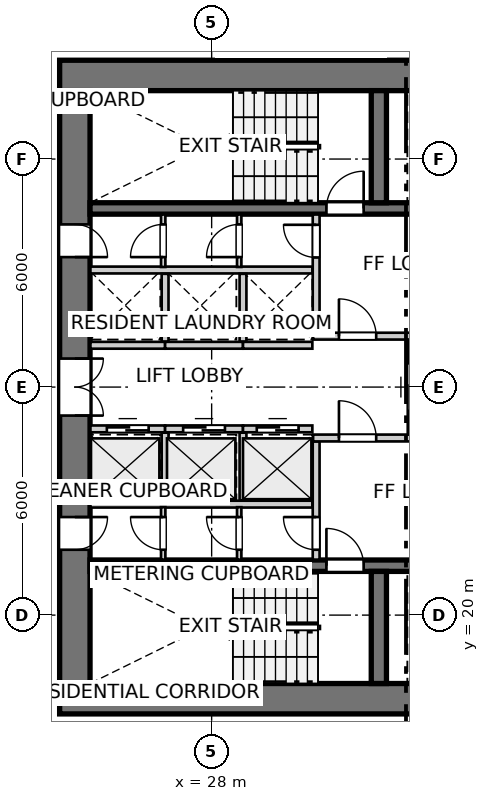
"""IFC4 building model, lengths in metres.
Left out: names, types, materials, properties, quantities, classifications, styles, units other than length and angle.
Written with IfcOpenShell. Run it as: python <this file> out.ifc"""

import sys

from ifc_helpers import new_model, si_unit, direction, frame, frame_2d, origin, place, context, subcontext, project, spatial, rectangle, extrude, source, transform, mapped, element, fill, save


model = new_model("IFC4")
c1 = context("Model", 3, precision=1e-05, world=origin(), true_north=direction((0.0, 1.0)))
c2 = subcontext(c1, "Body", "Model", "MODEL_VIEW")
j1 = project(units=[si_unit("LENGTHUNIT", "METRE"), si_unit("PLANEANGLEUNIT", "RADIAN")], contexts=[c1])
p1 = place(None, origin())
s1 = spatial("IfcSite", under=j1, at=p1, CompositionType="ELEMENT")
p2 = place(p1, origin())
s2 = spatial("IfcBuilding", under=s1, at=p2, CompositionType="ELEMENT")
p3 = place(p2, frame((0.0, 0.0, 30.2)))
s3 = spatial("IfcBuildingStorey", under=s2, at=p3, CompositionType="ELEMENT", Elevation=30.2)
for number, where, z_axis, x_axis in (
    (1, (24.0, 17.8, 0.0), (0.0, 0.0, 1.0), (1.0, 0.0, 0.0)),
    (2, (36.7, 34.2, 0.0), (0.0, 0.0, 1.0), (-1.0, 0.0, 0.0)),
):
    element("IfcWall", number, at=place(p3, frame(where, z_axis=z_axis, x_axis=x_axis)), inside=s3, PredefinedType="SHEAR", context=c2, shape_type="SweptSolid", body=[
        extrude(rectangle(XDim=12.7, YDim=0.8, at=frame_2d((6.35, 0.0))), origin(), (0.0, 0.0, 1.0), 2.935),
    ])
p4 = place(p3, frame((24.4, 33.8, 0.0), z_axis=(0.0, 0.0, 1.0), x_axis=(0.0, -1.0, 0.0)))
e3 = element("IfcWall", 3, at=p4, inside=s3, PredefinedType="SHEAR", context=c2, shape_type="SweptSolid", body=[
    extrude(rectangle(XDim=15.6, YDim=0.8, at=frame_2d((7.8, 0.0))), origin(), (0.0, 0.0, 1.0), 2.935),
])
p5 = place(p4, frame((7.05, 0.0, 0.0)))
e4 = element("IfcOpeningElement", 4, at=p5, cuts=e3, PredefinedType="OPENING", context=c2, shape_type="SweptSolid", body=[
    extrude(rectangle(XDim=1.5, YDim=2.15, at=frame_2d((0.75, 1.075))), frame((0.0, 0.41, 0.0), z_axis=(0.0, -1.0, 0.0), x_axis=(1.0, 0.0, 0.0)), (0.0, 0.0, 1.0), 0.82),
])
p6 = place(p4, frame((3.52, 0.0, 0.0)))
e5 = element("IfcOpeningElement", 5, at=p6, cuts=e3, PredefinedType="OPENING", context=c2, shape_type="SweptSolid", body=[
    extrude(rectangle(XDim=0.86, YDim=2.05, at=frame_2d((0.43, 1.025))), frame((0.0, 0.41, 0.0), z_axis=(0.0, -1.0, 0.0), x_axis=(1.0, 0.0, 0.0)), (0.0, 0.0, 1.0), 0.82),
])
p7 = place(p4, frame((11.22, 0.0, 0.0)))
e6 = element("IfcOpeningElement", 6, at=p7, cuts=e3, PredefinedType="OPENING", context=c2, shape_type="SweptSolid", body=[
    extrude(rectangle(XDim=0.86, YDim=2.05, at=frame_2d((0.43, 1.025))), frame((0.0, 0.41, 0.0), z_axis=(0.0, -1.0, 0.0), x_axis=(1.0, 0.0, 0.0)), (0.0, 0.0, 1.0), 0.82),
])
p8 = place(p3, frame((24.8, 21.3, 0.0), z_axis=(0.0, 0.0, 1.0), x_axis=(1.0, 0.0, 0.0)))
e7 = element("IfcWall", 7, at=p8, inside=s3, PredefinedType="SHEAR", context=c2, shape_type="SweptSolid", body=[
    extrude(rectangle(XDim=11.1, YDim=0.3, at=frame_2d((5.55, 0.0))), origin(), (0.0, 0.0, 1.0), 2.935),
])
p9 = place(p8, frame((6.22, 0.0, 0.0)))
e8 = element("IfcOpeningElement", 8, at=p9, cuts=e7, PredefinedType="OPENING", context=c2, shape_type="SweptSolid", body=[
    extrude(rectangle(XDim=0.98, YDim=2.15, at=frame_2d((0.49, 1.075))), frame((0.0, 0.16, 0.0), z_axis=(0.0, -1.0, 0.0), x_axis=(1.0, 0.0, 0.0)), (0.0, 0.0, 1.0), 0.32),
])
p10 = place(p8, frame((9.15, 0.0, 0.0)))
e9 = element("IfcOpeningElement", 9, at=p10, cuts=e7, PredefinedType="OPENING", context=c2, shape_type="SweptSolid", body=[
    extrude(rectangle(XDim=1.15, YDim=2.15, at=frame_2d((0.575, 1.075))), frame((0.0, 0.16, 0.0), z_axis=(0.0, -1.0, 0.0), x_axis=(1.0, 0.0, 0.0)), (0.0, 0.0, 1.0), 0.32),
])
p11 = place(p3, frame((32.4, 18.2, 0.0), z_axis=(0.0, 0.0, 1.0), x_axis=(0.0, 1.0, 0.0)))
e10 = element("IfcWall", 10, at=p11, inside=s3, PredefinedType="SHEAR", context=c2, shape_type="SweptSolid", body=[
    extrude(rectangle(XDim=2.95, YDim=0.4, at=frame_2d((1.475, 0.0))), origin(), (0.0, 0.0, 1.0), 2.935),
])
p12 = place(p3, frame((24.8, 30.7, 0.0), z_axis=(0.0, 0.0, 1.0), x_axis=(1.0, 0.0, 0.0)))
e11 = element("IfcWall", 11, at=p12, inside=s3, PredefinedType="SHEAR", context=c2, shape_type="SweptSolid", body=[
    extrude(rectangle(XDim=11.1, YDim=0.3, at=frame_2d((5.55, 0.0))), origin(), (0.0, 0.0, 1.0), 2.935),
])
p13 = place(p12, frame((6.22, 0.0, 0.0)))
e12 = element("IfcOpeningElement", 12, at=p13, cuts=e11, PredefinedType="OPENING", context=c2, shape_type="SweptSolid", body=[
    extrude(rectangle(XDim=0.98, YDim=2.15, at=frame_2d((0.49, 1.075))), frame((0.0, 0.16, 0.0), z_axis=(0.0, -1.0, 0.0), x_axis=(1.0, 0.0, 0.0)), (0.0, 0.0, 1.0), 0.32),
])
p14 = place(p12, frame((9.15, 0.0, 0.0)))
e13 = element("IfcOpeningElement", 13, at=p14, cuts=e11, PredefinedType="OPENING", context=c2, shape_type="SweptSolid", body=[
    extrude(rectangle(XDim=1.15, YDim=2.15, at=frame_2d((0.575, 1.075))), frame((0.0, 0.16, 0.0), z_axis=(0.0, -1.0, 0.0), x_axis=(1.0, 0.0, 0.0)), (0.0, 0.0, 1.0), 0.32),
])
p15 = place(p3, frame((32.4, 30.85, 0.0), z_axis=(0.0, 0.0, 1.0), x_axis=(0.0, 1.0, 0.0)))
e14 = element("IfcWall", 14, at=p15, inside=s3, PredefinedType="SHEAR", context=c2, shape_type="SweptSolid", body=[
    extrude(rectangle(XDim=2.95, YDim=0.4, at=frame_2d((1.475, 0.0))), origin(), (0.0, 0.0, 1.0), 2.935),
])
p16 = place(p3, frame((30.75, 21.46, 0.0), z_axis=(0.0, 0.0, 1.0), x_axis=(0.0, 1.0, 0.0)))
e15 = element("IfcWall", 15, at=p16, inside=s3, PredefinedType="PARTITIONING", context=c2, shape_type="SweptSolid", body=[
    extrude(rectangle(XDim=3.11, YDim=0.18, at=frame_2d((1.555, 0.0))), origin(), (0.0, 0.0, 1.0), 2.935),
])
p17 = place(p16, frame((0.26, 0.0, 0.0)))
e16 = element("IfcOpeningElement", 16, at=p17, cuts=e15, PredefinedType="OPENING", context=c2, shape_type="SweptSolid", body=[
    extrude(rectangle(XDim=0.86, YDim=2.05, at=frame_2d((0.43, 1.025))), frame((0.0, 0.1, 0.0), z_axis=(0.0, -1.0, 0.0), x_axis=(1.0, 0.0, 0.0)), (0.0, 0.0, 1.0), 0.2),
])
p18 = place(p3, frame((30.67, 24.66, 0.0), z_axis=(0.0, 0.0, 1.0), x_axis=(1.0, 0.0, 0.0)))
e17 = element("IfcWall", 17, at=p18, inside=s3, PredefinedType="PARTITIONING", context=c2, shape_type="SweptSolid", body=[
    extrude(rectangle(XDim=5.22, YDim=0.18, at=frame_2d((2.61, 0.0))), origin(), (0.0, 0.0, 1.0), 2.935),
])
p19 = place(p18, frame((0.68, 0.0, 0.0)))
e18 = element("IfcOpeningElement", 18, at=p19, cuts=e17, PredefinedType="OPENING", context=c2, shape_type="SweptSolid", body=[
    extrude(rectangle(XDim=0.98, YDim=2.15, at=frame_2d((0.49, 1.075))), frame((0.0, 0.1, 0.0), z_axis=(0.0, -1.0, 0.0), x_axis=(1.0, 0.0, 0.0)), (0.0, 0.0, 1.0), 0.2),
])
p20 = place(p3, frame((30.75, 27.43, 0.0), z_axis=(0.0, 0.0, 1.0), x_axis=(0.0, 1.0, 0.0)))
e19 = element("IfcWall", 19, at=p20, inside=s3, PredefinedType="PARTITIONING", context=c2, shape_type="SweptSolid", body=[
    extrude(rectangle(XDim=3.11, YDim=0.18, at=frame_2d((1.555, 0.0))), origin(), (0.0, 0.0, 1.0), 2.935),
])
p21 = place(p20, frame((1.98, 0.0, 0.0)))
e20 = element("IfcOpeningElement", 20, at=p21, cuts=e19, PredefinedType="OPENING", context=c2, shape_type="SweptSolid", body=[
    extrude(rectangle(XDim=0.86, YDim=2.05, at=frame_2d((0.43, 1.025))), frame((0.0, 0.1, 0.0), z_axis=(0.0, -1.0, 0.0), x_axis=(1.0, 0.0, 0.0)), (0.0, 0.0, 1.0), 0.2),
])
p22 = place(p3, frame((30.67, 27.34, 0.0), z_axis=(0.0, 0.0, 1.0), x_axis=(1.0, 0.0, 0.0)))
e21 = element("IfcWall", 21, at=p22, inside=s3, PredefinedType="PARTITIONING", context=c2, shape_type="SweptSolid", body=[
    extrude(rectangle(XDim=5.22, YDim=0.18, at=frame_2d((2.61, 0.0))), origin(), (0.0, 0.0, 1.0), 2.935),
])
p23 = place(p22, frame((0.68, 0.0, 0.0)))
e22 = element("IfcOpeningElement", 22, at=p23, cuts=e21, PredefinedType="OPENING", context=c2, shape_type="SweptSolid", body=[
    extrude(rectangle(XDim=0.98, YDim=2.15, at=frame_2d((0.49, 1.075))), frame((0.0, 0.1, 0.0), z_axis=(0.0, -1.0, 0.0), x_axis=(1.0, 0.0, 0.0)), (0.0, 0.0, 1.0), 0.2),
])
p24 = place(p3, frame((33.25, 24.76, 0.0), z_axis=(0.0, 0.0, 1.0), x_axis=(0.0, 1.0, 0.0)))
e23 = element("IfcWall", 23, at=p24, inside=s3, PredefinedType="PARTITIONING", context=c2, shape_type="SweptSolid", body=[
    extrude(rectangle(XDim=2.48, YDim=0.18, at=frame_2d((1.24, 0.0))), origin(), (0.0, 0.0, 1.0), 2.935),
])
p25 = place(p24, frame((0.615, 0.0, 0.0)))
e24 = element("IfcOpeningElement", 24, at=p25, cuts=e23, PredefinedType="OPENING", context=c2, shape_type="SweptSolid", body=[
    extrude(rectangle(XDim=1.25, YDim=2.15, at=frame_2d((0.625, 1.075))), frame((0.0, 0.1, 0.0), z_axis=(0.0, -1.0, 0.0), x_axis=(1.0, 0.0, 0.0)), (0.0, 0.0, 1.0), 0.2),
])
p26 = place(p3, frame((24.81, 22.92, 0.0), z_axis=(0.0, 0.0, 1.0), x_axis=(1.0, 0.0, 0.0)))
e25 = element("IfcWall", 25, at=p26, inside=s3, PredefinedType="PARTITIONING", context=c2, shape_type="SweptSolid", body=[
    extrude(rectangle(XDim=5.84, YDim=0.18, at=frame_2d((2.92, 0.0))), origin(), (0.0, 0.0, 1.0), 2.935),
])
p27 = place(p3, frame((24.81, 24.9, 0.0), z_axis=(0.0, 0.0, 1.0), x_axis=(1.0, 0.0, 0.0)))
e26 = element("IfcWall", 26, at=p27, inside=s3, PredefinedType="PARTITIONING", context=c2, shape_type="SweptSolid", body=[
    extrude(rectangle(XDim=1.965, YDim=0.18, at=frame_2d((0.982, 0.0))), origin(), (0.0, 0.0, 1.0), 2.935),
])
p28 = place(p27, frame((0.433, 0.0, 0.0)))
e27 = element("IfcOpeningElement", 27, at=p28, cuts=e26, PredefinedType="OPENING", context=c2, shape_type="SweptSolid", body=[
    extrude(rectangle(XDim=1.1, YDim=2.15, at=frame_2d((0.55, 1.075))), frame((0.0, 0.1, 0.0), z_axis=(0.0, -1.0, 0.0), x_axis=(1.0, 0.0, 0.0)), (0.0, 0.0, 1.0), 0.2),
])
p29 = place(p3, frame((26.775, 24.9, 0.0), z_axis=(0.0, 0.0, 1.0), x_axis=(1.0, 0.0, 0.0)))
e28 = element("IfcWall", 28, at=p29, inside=s3, PredefinedType="PARTITIONING", context=c2, shape_type="SweptSolid", body=[
    extrude(rectangle(XDim=2.05, YDim=0.18, at=frame_2d((1.025, 0.0))), origin(), (0.0, 0.0, 1.0), 2.935),
])
p30 = place(p29, frame((0.475, 0.0, 0.0)))
e29 = element("IfcOpeningElement", 29, at=p30, cuts=e28, PredefinedType="OPENING", context=c2, shape_type="SweptSolid", body=[
    extrude(rectangle(XDim=1.1, YDim=2.15, at=frame_2d((0.55, 1.075))), frame((0.0, 0.1, 0.0), z_axis=(0.0, -1.0, 0.0), x_axis=(1.0, 0.0, 0.0)), (0.0, 0.0, 1.0), 0.2),
])
p31 = place(p3, frame((26.775, 23.02, 0.0), z_axis=(0.0, 0.0, 1.0), x_axis=(0.0, 1.0, 0.0)))
e30 = element("IfcWall", 30, at=p31, inside=s3, PredefinedType="PARTITIONING", context=c2, shape_type="SweptSolid", body=[
    extrude(rectangle(XDim=1.78, YDim=0.18, at=frame_2d((0.89, 0.0))), origin(), (0.0, 0.0, 1.0), 2.935),
])
p32 = place(p3, frame((28.825, 24.9, 0.0), z_axis=(0.0, 0.0, 1.0), x_axis=(1.0, 0.0, 0.0)))
e31 = element("IfcWall", 31, at=p32, inside=s3, PredefinedType="PARTITIONING", context=c2, shape_type="SweptSolid", body=[
    extrude(rectangle(XDim=1.825, YDim=0.18, at=frame_2d((0.913, 0.0))), origin(), (0.0, 0.0, 1.0), 2.935),
])
p33 = place(p32, frame((0.363, 0.0, 0.0)))
e32 = element("IfcOpeningElement", 32, at=p33, cuts=e31, PredefinedType="OPENING", context=c2, shape_type="SweptSolid", body=[
    extrude(rectangle(XDim=1.1, YDim=2.15, at=frame_2d((0.55, 1.075))), frame((0.0, 0.1, 0.0), z_axis=(0.0, -1.0, 0.0), x_axis=(1.0, 0.0, 0.0)), (0.0, 0.0, 1.0), 0.2),
])
p34 = place(p3, frame((28.825, 23.02, 0.0), z_axis=(0.0, 0.0, 1.0), x_axis=(0.0, 1.0, 0.0)))
e33 = element("IfcWall", 33, at=p34, inside=s3, PredefinedType="PARTITIONING", context=c2, shape_type="SweptSolid", body=[
    extrude(rectangle(XDim=1.78, YDim=0.18, at=frame_2d((0.89, 0.0))), origin(), (0.0, 0.0, 1.0), 2.935),
])
p35 = place(p3, frame((24.81, 29.08, 0.0), z_axis=(0.0, 0.0, 1.0), x_axis=(1.0, 0.0, 0.0)))
e34 = element("IfcWall", 34, at=p35, inside=s3, PredefinedType="PARTITIONING", context=c2, shape_type="SweptSolid", body=[
    extrude(rectangle(XDim=5.84, YDim=0.18, at=frame_2d((2.92, 0.0))), origin(), (0.0, 0.0, 1.0), 2.935),
])
p36 = place(p3, frame((24.81, 27.1, 0.0), z_axis=(0.0, 0.0, 1.0), x_axis=(1.0, 0.0, 0.0)))
e35 = element("IfcWall", 35, at=p36, inside=s3, PredefinedType="PARTITIONING", context=c2, shape_type="SweptSolid", body=[
    extrude(rectangle(XDim=1.965, YDim=0.18, at=frame_2d((0.982, 0.0))), origin(), (0.0, 0.0, 1.0), 2.935),
])
p37 = place(p3, frame((26.775, 27.1, 0.0), z_axis=(0.0, 0.0, 1.0), x_axis=(1.0, 0.0, 0.0)))
e36 = element("IfcWall", 36, at=p37, inside=s3, PredefinedType="PARTITIONING", context=c2, shape_type="SweptSolid", body=[
    extrude(rectangle(XDim=2.05, YDim=0.18, at=frame_2d((1.025, 0.0))), origin(), (0.0, 0.0, 1.0), 2.935),
])
p38 = place(p3, frame((26.775, 27.2, 0.0), z_axis=(0.0, 0.0, 1.0), x_axis=(0.0, 1.0, 0.0)))
e37 = element("IfcWall", 37, at=p38, inside=s3, PredefinedType="PARTITIONING", context=c2, shape_type="SweptSolid", body=[
    extrude(rectangle(XDim=1.78, YDim=0.18, at=frame_2d((0.89, 0.0))), origin(), (0.0, 0.0, 1.0), 2.935),
])
p39 = place(p3, frame((28.825, 27.1, 0.0), z_axis=(0.0, 0.0, 1.0), x_axis=(1.0, 0.0, 0.0)))
e38 = element("IfcWall", 38, at=p39, inside=s3, PredefinedType="PARTITIONING", context=c2, shape_type="SweptSolid", body=[
    extrude(rectangle(XDim=1.825, YDim=0.18, at=frame_2d((0.913, 0.0))), origin(), (0.0, 0.0, 1.0), 2.935),
])
p40 = place(p3, frame((28.825, 27.2, 0.0), z_axis=(0.0, 0.0, 1.0), x_axis=(0.0, 1.0, 0.0)))
e39 = element("IfcWall", 39, at=p40, inside=s3, PredefinedType="PARTITIONING", context=c2, shape_type="SweptSolid", body=[
    extrude(rectangle(XDim=1.78, YDim=0.18, at=frame_2d((0.89, 0.0))), origin(), (0.0, 0.0, 1.0), 2.935),
])
p41 = place(p3, frame((26.725, 21.46, 0.0), z_axis=(0.0, 0.0, 1.0), x_axis=(0.0, 1.0, 0.0)))
e40 = element("IfcWall", 40, at=p41, inside=s3, PredefinedType="PARTITIONING", context=c2, shape_type="SweptSolid", body=[
    extrude(rectangle(XDim=1.38, YDim=0.115, at=frame_2d((0.69, 0.0))), origin(), (0.0, 0.0, 1.0), 2.935),
])
p42 = place(p41, frame((0.26, 0.0, 0.0)))
e41 = element("IfcOpeningElement", 41, at=p42, cuts=e40, PredefinedType="OPENING", context=c2, shape_type="SweptSolid", body=[
    extrude(rectangle(XDim=0.86, YDim=2.05, at=frame_2d((0.43, 1.025))), frame((0.0, 0.067, 0.0), z_axis=(0.0, -1.0, 0.0), x_axis=(1.0, 0.0, 0.0)), (0.0, 0.0, 1.0), 0.135),
])
p43 = place(p3, frame((26.725, 29.16, 0.0), z_axis=(0.0, 0.0, 1.0), x_axis=(0.0, 1.0, 0.0)))
e42 = element("IfcWall", 42, at=p43, inside=s3, PredefinedType="PARTITIONING", context=c2, shape_type="SweptSolid", body=[
    extrude(rectangle(XDim=1.38, YDim=0.115, at=frame_2d((0.69, 0.0))), origin(), (0.0, 0.0, 1.0), 2.935),
])
p44 = place(p43, frame((0.26, 0.0, 0.0)))
e43 = element("IfcOpeningElement", 43, at=p44, cuts=e42, PredefinedType="OPENING", context=c2, shape_type="SweptSolid", body=[
    extrude(rectangle(XDim=0.86, YDim=2.05, at=frame_2d((0.43, 1.025))), frame((0.0, 0.067, 0.0), z_axis=(0.0, -1.0, 0.0), x_axis=(1.0, 0.0, 0.0)), (0.0, 0.0, 1.0), 0.135),
])
p45 = place(p3, frame((28.725, 21.46, 0.0), z_axis=(0.0, 0.0, 1.0), x_axis=(0.0, 1.0, 0.0)))
e44 = element("IfcWall", 44, at=p45, inside=s3, PredefinedType="PARTITIONING", context=c2, shape_type="SweptSolid", body=[
    extrude(rectangle(XDim=1.38, YDim=0.115, at=frame_2d((0.69, 0.0))), origin(), (0.0, 0.0, 1.0), 2.935),
])
p46 = place(p45, frame((0.26, 0.0, 0.0)))
e45 = element("IfcOpeningElement", 45, at=p46, cuts=e44, PredefinedType="OPENING", context=c2, shape_type="SweptSolid", body=[
    extrude(rectangle(XDim=0.86, YDim=2.05, at=frame_2d((0.43, 1.025))), frame((0.0, 0.067, 0.0), z_axis=(0.0, -1.0, 0.0), x_axis=(1.0, 0.0, 0.0)), (0.0, 0.0, 1.0), 0.135),
])
p47 = place(p3, frame((28.725, 29.16, 0.0), z_axis=(0.0, 0.0, 1.0), x_axis=(0.0, 1.0, 0.0)))
e46 = element("IfcWall", 46, at=p47, inside=s3, PredefinedType="PARTITIONING", context=c2, shape_type="SweptSolid", body=[
    extrude(rectangle(XDim=1.38, YDim=0.115, at=frame_2d((0.69, 0.0))), origin(), (0.0, 0.0, 1.0), 2.935),
])
p48 = place(p47, frame((0.26, 0.0, 0.0)))
e47 = element("IfcOpeningElement", 47, at=p48, cuts=e46, PredefinedType="OPENING", context=c2, shape_type="SweptSolid", body=[
    extrude(rectangle(XDim=0.86, YDim=2.05, at=frame_2d((0.43, 1.025))), frame((0.0, 0.067, 0.0), z_axis=(0.0, -1.0, 0.0), x_axis=(1.0, 0.0, 0.0)), (0.0, 0.0, 1.0), 0.135),
])
m1 = source(origin(), c2, "Body", "SweptSolid", [
    extrude(rectangle(XDim=0.98, YDim=2.15, at=frame_2d((0.49, 1.075))), frame((0.0, 0.025, 0.0), z_axis=(0.0, -1.0, 0.0), x_axis=(1.0, 0.0, 0.0)), (0.0, 0.0, 1.0), 0.05),
])
p49 = place(p9, origin())
e48 = element("IfcDoor", 48, at=p49, inside=s3, OperationType="SINGLE_SWING_LEFT", PredefinedType="DOOR", context=c2, shape_type="MappedRepresentation", body=[
    mapped(m1, transform((0.0, 0.0, 0.0), x_axis=(1.0, 0.0, 0.0), y_axis=(0.0, 1.0, 0.0), z_axis=(0.0, 0.0, 1.0), scale=1.0)),
])
fill(e8, e48)
p50 = place(p13, origin())
e49 = element("IfcDoor", 49, at=p50, inside=s3, OperationType="SINGLE_SWING_RIGHT", PredefinedType="DOOR", context=c2, shape_type="MappedRepresentation", body=[
    mapped(m1, transform((0.0, 0.0, 0.0), x_axis=(1.0, 0.0, 0.0), y_axis=(0.0, 1.0, 0.0), z_axis=(0.0, 0.0, 1.0), scale=1.0)),
])
fill(e12, e49)
m2 = source(origin(), c2, "Body", "SweptSolid", [
    extrude(rectangle(XDim=1.5, YDim=2.15, at=frame_2d((0.75, 1.075))), frame((0.0, 0.025, 0.0), z_axis=(0.0, -1.0, 0.0), x_axis=(1.0, 0.0, 0.0)), (0.0, 0.0, 1.0), 0.05),
])
p51 = place(p5, origin())
e50 = element("IfcDoor", 50, at=p51, inside=s3, OperationType="DOUBLE_DOOR_SINGLE_SWING", PredefinedType="DOOR", context=c2, shape_type="MappedRepresentation", body=[
    mapped(m2, transform((0.0, 0.0, 0.0), x_axis=(1.0, 0.0, 0.0), y_axis=(0.0, 1.0, 0.0), z_axis=(0.0, 0.0, 1.0), scale=1.0)),
])
fill(e4, e50)
m3 = source(origin(), c2, "Body", "SweptSolid", [
    extrude(rectangle(XDim=0.86, YDim=2.05, at=frame_2d((0.43, 1.025))), frame((0.0, 0.025, 0.0), z_axis=(0.0, -1.0, 0.0), x_axis=(1.0, 0.0, 0.0)), (0.0, 0.0, 1.0), 0.05),
])
p52 = place(p6, origin())
e51 = element("IfcDoor", 51, at=p52, inside=s3, OperationType="SINGLE_SWING_RIGHT", PredefinedType="DOOR", context=c2, shape_type="MappedRepresentation", body=[
    mapped(m3, transform((0.0, 0.0, 0.0), x_axis=(1.0, 0.0, 0.0), y_axis=(0.0, 1.0, 0.0), z_axis=(0.0, 0.0, 1.0), scale=1.0)),
])
fill(e5, e51)
p53 = place(p7, origin())
e52 = element("IfcDoor", 52, at=p53, inside=s3, OperationType="SINGLE_SWING_LEFT", PredefinedType="DOOR", context=c2, shape_type="MappedRepresentation", body=[
    mapped(m3, transform((0.0, 0.0, 0.0), x_axis=(1.0, 0.0, 0.0), y_axis=(0.0, 1.0, 0.0), z_axis=(0.0, 0.0, 1.0), scale=1.0)),
])
fill(e6, e52)
p54 = place(p17, origin())
e53 = element("IfcDoor", 53, at=p54, inside=s3, OperationType="SINGLE_SWING_RIGHT", PredefinedType="DOOR", context=c2, shape_type="MappedRepresentation", body=[
    mapped(m3, transform((0.0, 0.0, 0.0), x_axis=(1.0, 0.0, 0.0), y_axis=(0.0, 1.0, 0.0), z_axis=(0.0, 0.0, 1.0), scale=1.0)),
])
fill(e16, e53)
p55 = place(p19, origin())
e54 = element("IfcDoor", 54, at=p55, inside=s3, OperationType="SINGLE_SWING_LEFT", PredefinedType="DOOR", context=c2, shape_type="MappedRepresentation", body=[
    mapped(m1, transform((0.0, 0.0, 0.0), x_axis=(1.0, 0.0, 0.0), y_axis=(0.0, 1.0, 0.0), z_axis=(0.0, 0.0, 1.0), scale=1.0)),
])
fill(e18, e54)
p56 = place(p21, origin())
e55 = element("IfcDoor", 55, at=p56, inside=s3, OperationType="SINGLE_SWING_RIGHT", PredefinedType="DOOR", context=c2, shape_type="MappedRepresentation", body=[
    mapped(m3, transform((0.0, 0.0, 0.0), x_axis=(1.0, 0.0, 0.0), y_axis=(0.0, 1.0, 0.0), z_axis=(0.0, 0.0, 1.0), scale=1.0)),
])
fill(e20, e55)
p57 = place(p23, origin())
e56 = element("IfcDoor", 56, at=p57, inside=s3, OperationType="SINGLE_SWING_LEFT", PredefinedType="DOOR", context=c2, shape_type="MappedRepresentation", body=[
    mapped(m1, transform((0.0, 0.0, 0.0), x_axis=(1.0, 0.0, 0.0), y_axis=(0.0, 1.0, 0.0), z_axis=(0.0, 0.0, 1.0), scale=1.0)),
])
fill(e22, e56)
m4 = source(origin(), c2, "Body", "SweptSolid", [
    extrude(rectangle(XDim=1.1, YDim=2.15, at=frame_2d((0.55, 1.075))), frame((0.0, 0.025, 0.0), z_axis=(0.0, -1.0, 0.0), x_axis=(1.0, 0.0, 0.0)), (0.0, 0.0, 1.0), 0.05),
])
p58 = place(p28, origin())
e57 = element("IfcDoor", 57, at=p58, inside=s3, OperationType="DOUBLE_DOOR_SLIDING", PredefinedType="DOOR", context=c2, shape_type="MappedRepresentation", body=[
    mapped(m4, transform((0.0, 0.0, 0.0), x_axis=(1.0, 0.0, 0.0), y_axis=(0.0, 1.0, 0.0), z_axis=(0.0, 0.0, 1.0), scale=1.0)),
])
fill(e27, e57)
p59 = place(p30, origin())
e58 = element("IfcDoor", 58, at=p59, inside=s3, OperationType="DOUBLE_DOOR_SLIDING", PredefinedType="DOOR", context=c2, shape_type="MappedRepresentation", body=[
    mapped(m4, transform((0.0, 0.0, 0.0), x_axis=(1.0, 0.0, 0.0), y_axis=(0.0, 1.0, 0.0), z_axis=(0.0, 0.0, 1.0), scale=1.0)),
])
fill(e29, e58)
p60 = place(p33, origin())
e59 = element("IfcDoor", 59, at=p60, inside=s3, OperationType="DOUBLE_DOOR_SLIDING", PredefinedType="DOOR", context=c2, shape_type="MappedRepresentation", body=[
    mapped(m4, transform((0.0, 0.0, 0.0), x_axis=(1.0, 0.0, 0.0), y_axis=(0.0, 1.0, 0.0), z_axis=(0.0, 0.0, 1.0), scale=1.0)),
])
fill(e32, e59)
p61 = place(p42, origin())
e60 = element("IfcDoor", 60, at=p61, inside=s3, OperationType="SINGLE_SWING_RIGHT", PredefinedType="DOOR", context=c2, shape_type="MappedRepresentation", body=[
    mapped(m3, transform((0.0, 0.0, 0.0), x_axis=(1.0, 0.0, 0.0), y_axis=(0.0, 1.0, 0.0), z_axis=(0.0, 0.0, 1.0), scale=1.0)),
])
fill(e41, e60)
p62 = place(p44, origin())
e61 = element("IfcDoor", 61, at=p62, inside=s3, OperationType="SINGLE_SWING_LEFT", PredefinedType="DOOR", context=c2, shape_type="MappedRepresentation", body=[
    mapped(m3, transform((0.0, 0.0, 0.0), x_axis=(1.0, 0.0, 0.0), y_axis=(0.0, 1.0, 0.0), z_axis=(0.0, 0.0, 1.0), scale=1.0)),
])
fill(e43, e61)
p63 = place(p46, origin())
e62 = element("IfcDoor", 62, at=p63, inside=s3, OperationType="SINGLE_SWING_RIGHT", PredefinedType="DOOR", context=c2, shape_type="MappedRepresentation", body=[
    mapped(m3, transform((0.0, 0.0, 0.0), x_axis=(1.0, 0.0, 0.0), y_axis=(0.0, 1.0, 0.0), z_axis=(0.0, 0.0, 1.0), scale=1.0)),
])
fill(e45, e62)
p64 = place(p48, origin())
e63 = element("IfcDoor", 63, at=p64, inside=s3, OperationType="SINGLE_SWING_LEFT", PredefinedType="DOOR", context=c2, shape_type="MappedRepresentation", body=[
    mapped(m3, transform((0.0, 0.0, 0.0), x_axis=(1.0, 0.0, 0.0), y_axis=(0.0, 1.0, 0.0), z_axis=(0.0, 0.0, 1.0), scale=1.0)),
])
fill(e47, e63)
save(model, sys.argv[1])
